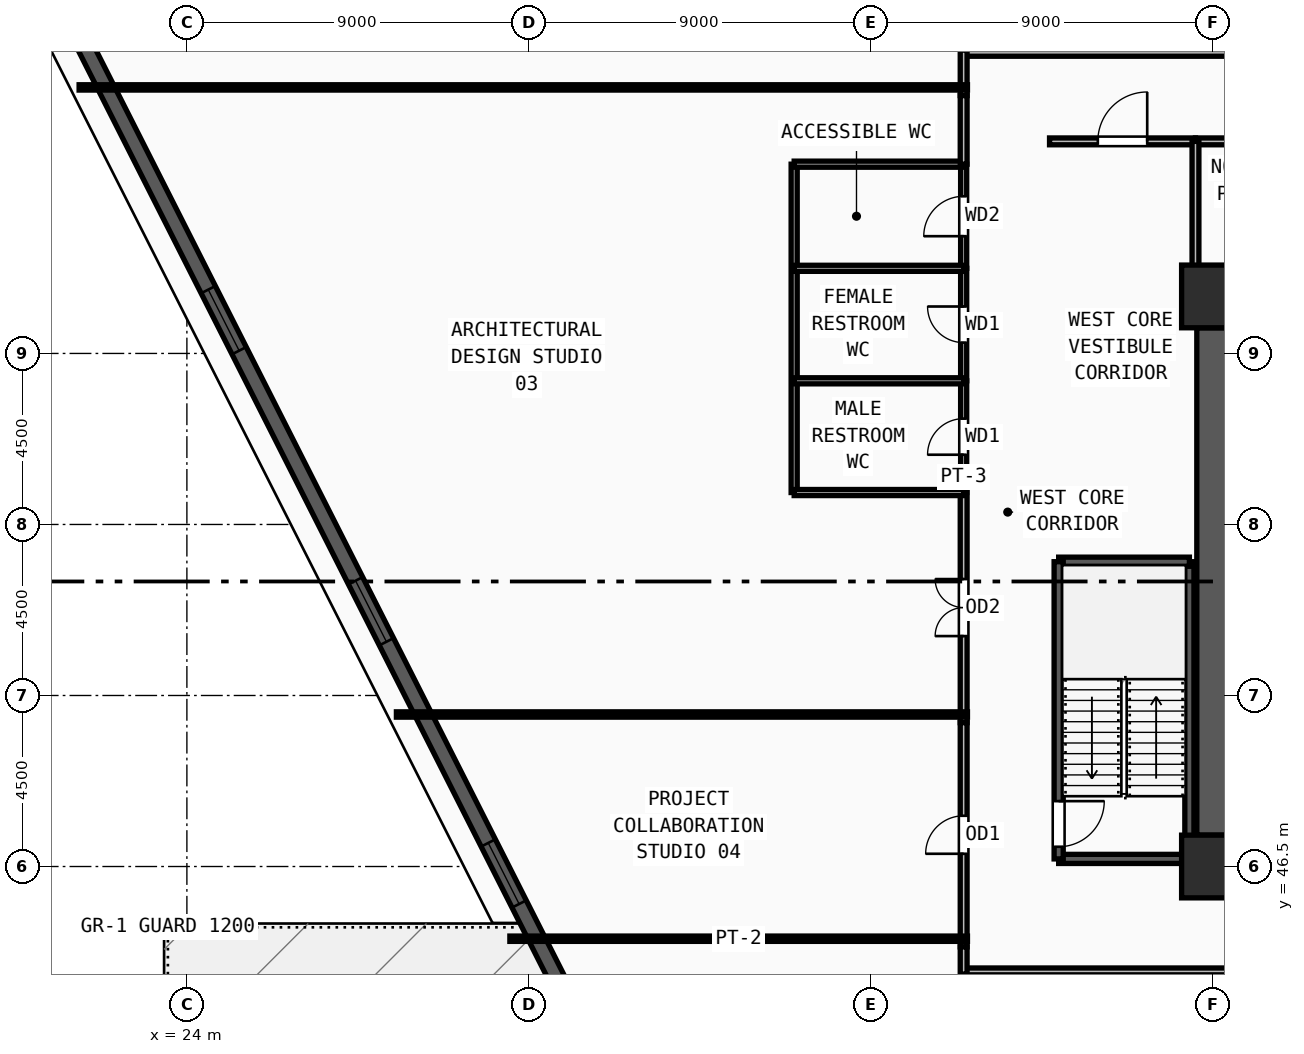
"""IFC4 building model, lengths in metres.
Left out: names, types, materials, properties, quantities, classifications, styles, units other than length and angle.
Written with IfcOpenShell. Run it as: python <this file> out.ifc"""

import sys

from ifc_helpers import new_model, si_unit, direction, frame, frame_2d, origin, origin_2d, place, context, subcontext, project, spatial, rectangle, extrude, source, transform, mapped, element, fill, save


model = new_model("IFC4")
c1 = context("Model", 3, precision=1e-05, world=origin(), true_north=direction((0.0, 1.0)))
c2 = subcontext(c1, "Body", "Model", "MODEL_VIEW")
j1 = project(units=[si_unit("LENGTHUNIT", "METRE"), si_unit("PLANEANGLEUNIT", "RADIAN")], contexts=[c1])
p1 = place(None, origin())
s1 = spatial("IfcSite", under=j1, at=p1, CompositionType="ELEMENT")
p2 = place(p1, origin())
s2 = spatial("IfcBuilding", under=s1, at=p2, CompositionType="ELEMENT")
p3 = place(p2, frame((0.0, 0.0, 28.5)))
s3 = spatial("IfcBuildingStorey", under=s2, at=p3, CompositionType="ELEMENT", Elevation=28.5)
m1 = source(origin(), c2, "Body", "SweptSolid", [
    extrude(rectangle(XDim=1.65, YDim=1.65, at=origin_2d()), origin(), (0.0, 0.0, 1.0), 3.75),
])
for number, where, z_axis, x_axis in (
    (1, (51.0, 46.5, 0.0), (0.0, 0.0, 1.0), (1.0, 0.0, 0.0)),
    (2, (51.0, 61.5, 0.0), (0.0, 0.0, 1.0), (1.0, 0.0, 0.0)),
):
    element("IfcColumn", number, at=place(p3, frame(where, z_axis=z_axis, x_axis=x_axis)), inside=s3, PredefinedType="COLUMN", context=c2, shape_type="MappedRepresentation", body=[
        mapped(m1, transform((0.0, 0.0, 0.0), x_axis=(1.0, 0.0, 0.0), y_axis=(0.0, 1.0, 0.0), z_axis=(0.0, 0.0, 1.0), scale=1.0)),
    ])
p4 = place(p3, frame((21.093, 68.534, 0.0), z_axis=(0.0, 0.0, 1.0), x_axis=(0.451540292752, -0.892250729348, 0.0)))
e3 = element("IfcWall", 3, at=p4, inside=s3, PredefinedType="SOLIDWALL", context=c2, shape_type="SweptSolid", body=[
    extrude(rectangle(XDim=34.333, YDim=0.42, at=frame_2d((17.167, 0.0))), origin(), (0.0, 0.0, 1.0), 3.57),
])
m2 = source(origin(), c2, "Body", "SweptSolid", [
    extrude(rectangle(XDim=1.8, YDim=1.95, at=frame_2d((0.9, 0.975))), frame((0.0, 0.22, 0.0), z_axis=(0.0, -1.0, 0.0), x_axis=(1.0, 0.0, 0.0)), (0.0, 0.0, 1.0), 0.44),
])
p5 = place(p4, frame((7.683, 0.0, 0.55)))
e4 = element("IfcOpeningElement", 4, at=p5, cuts=e3, PredefinedType="OPENING", context=c2, shape_type="MappedRepresentation", body=[
    mapped(m2, transform((0.0, 0.0, 0.0), x_axis=(1.0, 0.0, 0.0), y_axis=(0.0, 1.0, 0.0), z_axis=(0.0, 0.0, 1.0), scale=1.0)),
])
p6 = place(p4, frame((16.267, 0.0, 0.55)))
e5 = element("IfcOpeningElement", 5, at=p6, cuts=e3, PredefinedType="OPENING", context=c2, shape_type="MappedRepresentation", body=[
    mapped(m2, transform((0.0, 0.0, 0.0), x_axis=(1.0, 0.0, 0.0), y_axis=(0.0, 1.0, 0.0), z_axis=(0.0, 0.0, 1.0), scale=1.0)),
])
p7 = place(p4, frame((24.0, 0.0, 0.55)))
e6 = element("IfcOpeningElement", 6, at=p7, cuts=e3, PredefinedType="OPENING", context=c2, shape_type="MappedRepresentation", body=[
    mapped(m2, transform((0.0, 0.0, 0.0), x_axis=(1.0, 0.0, 0.0), y_axis=(0.0, 1.0, 0.0), z_axis=(0.0, 0.0, 1.0), scale=1.0)),
])
p8 = place(p3, frame((51.0, 47.325, 0.0), z_axis=(0.0, 0.0, 1.0), x_axis=(0.0, 1.0, 0.0)))
e7 = element("IfcWall", 7, at=p8, inside=s3, PredefinedType="SHEAR", context=c2, shape_type="SweptSolid", body=[
    extrude(rectangle(XDim=13.35, YDim=0.85, at=frame_2d((6.675, 0.0))), origin(), (0.0, 0.0, 1.0), 3.57),
])
p9 = place(p3, frame((46.94, 46.7, 0.0), z_axis=(0.0, 0.0, 1.0), x_axis=(1.0, 0.0, 0.0)))
e8 = element("IfcWall", 8, at=p9, inside=s3, PredefinedType="SOLIDWALL", context=c2, shape_type="SweptSolid", body=[
    extrude(rectangle(XDim=3.44, YDim=0.24, at=frame_2d((1.72, 0.0))), origin(), (0.0, 0.0, 1.0), 3.57),
])
p10 = place(p3, frame((50.38, 46.7, 0.0), z_axis=(0.0, 0.0, 1.0), x_axis=(0.0, 1.0, 0.0)))
e9 = element("IfcWall", 9, at=p10, inside=s3, PredefinedType="SOLIDWALL", context=c2, shape_type="SweptSolid", body=[
    extrude(rectangle(XDim=7.82, YDim=0.24, at=frame_2d((3.91, 0.0))), origin(), (0.0, 0.0, 1.0), 3.57),
])
p11 = place(p3, frame((50.38, 54.52, 0.0), z_axis=(0.0, 0.0, 1.0), x_axis=(-1.0, 0.0, 0.0)))
e10 = element("IfcWall", 10, at=p11, inside=s3, PredefinedType="SOLIDWALL", context=c2, shape_type="SweptSolid", body=[
    extrude(rectangle(XDim=3.44, YDim=0.24, at=frame_2d((1.72, 0.0))), origin(), (0.0, 0.0, 1.0), 3.57),
])
p12 = place(p3, frame((46.94, 54.52, 0.0), z_axis=(0.0, 0.0, 1.0), x_axis=(0.0, -1.0, 0.0)))
e11 = element("IfcWall", 11, at=p12, inside=s3, PredefinedType="SOLIDWALL", context=c2, shape_type="SweptSolid", body=[
    extrude(rectangle(XDim=7.82, YDim=0.24, at=frame_2d((3.91, 0.0))), origin(), (0.0, 0.0, 1.0), 3.57),
])
m3 = source(origin(), c2, "Body", "SweptSolid", [
    extrude(rectangle(XDim=1.2, YDim=2.2, at=frame_2d((0.6, 1.1))), frame((0.0, 0.13, 0.0), z_axis=(0.0, -1.0, 0.0), x_axis=(1.0, 0.0, 0.0)), (0.0, 0.0, 1.0), 0.26),
])
p13 = place(p12, frame((6.3, 0.0, 0.0)))
e12 = element("IfcOpeningElement", 12, at=p13, cuts=e11, PredefinedType="OPENING", context=c2, shape_type="MappedRepresentation", body=[
    mapped(m3, transform((0.0, 0.0, 0.0), x_axis=(1.0, 0.0, 0.0), y_axis=(0.0, 1.0, 0.0), z_axis=(0.0, 0.0, 1.0), scale=1.0)),
])
p14 = place(p3, frame((44.44, 56.34, 0.0), z_axis=(0.0, 0.0, 1.0), x_axis=(0.0, 1.0, 0.0)))
e13 = element("IfcWall", 13, at=p14, inside=s3, PredefinedType="PARTITIONING", context=c2, shape_type="SweptSolid", body=[
    extrude(rectangle(XDim=2.94, YDim=0.16, at=frame_2d((1.47, 0.0))), origin(), (0.0, 0.0, 1.0), 3.57),
])
m4 = source(origin(), c2, "Body", "SweptSolid", [
    extrude(rectangle(XDim=0.95, YDim=2.15, at=frame_2d((0.475, 1.075))), frame((0.0, 0.09, 0.0), z_axis=(0.0, -1.0, 0.0), x_axis=(1.0, 0.0, 0.0)), (0.0, 0.0, 1.0), 0.18),
])
p15 = place(p14, frame((0.995, 0.0, 0.0)))
e14 = element("IfcOpeningElement", 14, at=p15, cuts=e13, PredefinedType="OPENING", context=c2, shape_type="MappedRepresentation", body=[
    mapped(m4, transform((0.0, 0.0, 0.0), x_axis=(1.0, 0.0, 0.0), y_axis=(0.0, 1.0, 0.0), z_axis=(0.0, 0.0, 1.0), scale=1.0)),
])
p16 = place(p3, frame((44.44, 59.28, 0.0), z_axis=(0.0, 0.0, 1.0), x_axis=(0.0, 1.0, 0.0)))
e15 = element("IfcWall", 15, at=p16, inside=s3, PredefinedType="PARTITIONING", context=c2, shape_type="SweptSolid", body=[
    extrude(rectangle(XDim=2.96, YDim=0.16, at=frame_2d((1.48, 0.0))), origin(), (0.0, 0.0, 1.0), 3.57),
])
p17 = place(p16, frame((1.005, 0.0, 0.0)))
e16 = element("IfcOpeningElement", 16, at=p17, cuts=e15, PredefinedType="OPENING", context=c2, shape_type="MappedRepresentation", body=[
    mapped(m4, transform((0.0, 0.0, 0.0), x_axis=(1.0, 0.0, 0.0), y_axis=(0.0, 1.0, 0.0), z_axis=(0.0, 0.0, 1.0), scale=1.0)),
])
p18 = place(p3, frame((44.44, 62.24, 0.0), z_axis=(0.0, 0.0, 1.0), x_axis=(0.0, 1.0, 0.0)))
e17 = element("IfcWall", 17, at=p18, inside=s3, PredefinedType="PARTITIONING", context=c2, shape_type="SweptSolid", body=[
    extrude(rectangle(XDim=2.74, YDim=0.16, at=frame_2d((1.37, 0.0))), origin(), (0.0, 0.0, 1.0), 3.57),
])
m5 = source(origin(), c2, "Body", "SweptSolid", [
    extrude(rectangle(XDim=1.05, YDim=2.15, at=frame_2d((0.525, 1.075))), frame((0.0, 0.09, 0.0), z_axis=(0.0, -1.0, 0.0), x_axis=(1.0, 0.0, 0.0)), (0.0, 0.0, 1.0), 0.18),
])
p19 = place(p18, frame((0.845, 0.0, 0.0)))
e18 = element("IfcOpeningElement", 18, at=p19, cuts=e17, PredefinedType="OPENING", context=c2, shape_type="MappedRepresentation", body=[
    mapped(m5, transform((0.0, 0.0, 0.0), x_axis=(1.0, 0.0, 0.0), y_axis=(0.0, 1.0, 0.0), z_axis=(0.0, 0.0, 1.0), scale=1.0)),
])
p20 = place(p3, frame((50.54, 65.58, 0.0), z_axis=(0.0, 0.0, 1.0), x_axis=(1.0, 0.0, 0.0)))
e19 = element("IfcWall", 19, at=p20, inside=s3, PredefinedType="PARTITIONING", context=c2, shape_type="SweptSolid", body=[
    extrude(rectangle(XDim=3.87, YDim=0.18, at=frame_2d((1.935, 0.0))), origin(), (0.0, 0.0, 1.0), 3.57),
])
m6 = source(origin(), c2, "Body", "SweptSolid", [
    extrude(rectangle(XDim=1.0, YDim=2.2, at=frame_2d((0.5, 1.1))), frame((0.0, 0.1, 0.0), z_axis=(0.0, -1.0, 0.0), x_axis=(1.0, 0.0, 0.0)), (0.0, 0.0, 1.0), 0.2),
])
p21 = place(p20, frame((1.435, 0.0, 0.0)))
e20 = element("IfcOpeningElement", 20, at=p21, cuts=e19, PredefinedType="OPENING", context=c2, shape_type="MappedRepresentation", body=[
    mapped(m6, transform((0.0, 0.0, 0.0), x_axis=(1.0, 0.0, 0.0), y_axis=(0.0, 1.0, 0.0), z_axis=(0.0, 0.0, 1.0), scale=1.0)),
])
p22 = place(p3, frame((46.7, 65.58, 0.0), z_axis=(0.0, 0.0, 1.0), x_axis=(1.0, 0.0, 0.0)))
e21 = element("IfcWall", 21, at=p22, inside=s3, PredefinedType="PARTITIONING", context=c2, shape_type="SweptSolid", body=[
    extrude(rectangle(XDim=3.84, YDim=0.18, at=frame_2d((1.92, 0.0))), origin(), (0.0, 0.0, 1.0), 3.57),
])
m7 = source(origin(), c2, "Body", "SweptSolid", [
    extrude(rectangle(XDim=1.3, YDim=2.2, at=frame_2d((0.65, 1.1))), frame((0.0, 0.1, 0.0), z_axis=(0.0, -1.0, 0.0), x_axis=(1.0, 0.0, 0.0)), (0.0, 0.0, 1.0), 0.2),
])
p23 = place(p22, frame((1.27, 0.0, 0.0)))
e22 = element("IfcOpeningElement", 22, at=p23, cuts=e21, PredefinedType="OPENING", context=c2, shape_type="MappedRepresentation", body=[
    mapped(m7, transform((0.0, 0.0, 0.0), x_axis=(1.0, 0.0, 0.0), y_axis=(0.0, 1.0, 0.0), z_axis=(0.0, 0.0, 1.0), scale=1.0)),
])
p24 = place(p3, frame((44.37, 67.91, 0.0), z_axis=(0.0, 0.0, 1.0), x_axis=(1.0, 0.0, 0.0)))
e23 = element("IfcWall", 23, at=p24, inside=s3, PredefinedType="PARTITIONING", context=c2, shape_type="SweptSolid", body=[
    extrude(rectangle(XDim=31.26, YDim=0.18, at=frame_2d((15.63, 0.0))), origin(), (0.0, 0.0, 1.0), 3.57),
])
m8 = source(origin(), c2, "Body", "SweptSolid", [
    extrude(rectangle(XDim=1.5, YDim=2.2, at=frame_2d((0.75, 1.1))), frame((0.0, 0.1, 0.0), z_axis=(0.0, -1.0, 0.0), x_axis=(1.0, 0.0, 0.0)), (0.0, 0.0, 1.0), 0.2),
])
p25 = place(p24, frame((14.88, 0.0, 0.0)))
e24 = element("IfcOpeningElement", 24, at=p25, cuts=e23, PredefinedType="OPENING", context=c2, shape_type="MappedRepresentation", body=[
    mapped(m8, transform((0.0, 0.0, 0.0), x_axis=(1.0, 0.0, 0.0), y_axis=(0.0, 1.0, 0.0), z_axis=(0.0, 0.0, 1.0), scale=1.0)),
])
p26 = place(p3, frame((44.44, 50.285, 0.0), z_axis=(0.0, 0.0, 1.0), x_axis=(0.0, 1.0, 0.0)))
e25 = element("IfcWall", 25, at=p26, inside=s3, PredefinedType="PARTITIONING", context=c2, shape_type="SweptSolid", body=[
    extrude(rectangle(XDim=6.055, YDim=0.18, at=frame_2d((3.028, 0.0))), origin(), (0.0, 0.0, 1.0), 3.57),
])
p27 = place(p26, frame((2.278, 0.0, 0.0)))
e26 = element("IfcOpeningElement", 26, at=p27, cuts=e25, PredefinedType="OPENING", context=c2, shape_type="MappedRepresentation", body=[
    mapped(m8, transform((0.0, 0.0, 0.0), x_axis=(1.0, 0.0, 0.0), y_axis=(0.0, 1.0, 0.0), z_axis=(0.0, 0.0, 1.0), scale=1.0)),
])
p28 = place(p3, frame((44.44, 44.385, 0.0), z_axis=(0.0, 0.0, 1.0), x_axis=(0.0, 1.0, 0.0)))
e27 = element("IfcWall", 27, at=p28, inside=s3, PredefinedType="PARTITIONING", context=c2, shape_type="SweptSolid", body=[
    extrude(rectangle(XDim=5.9, YDim=0.18, at=frame_2d((2.95, 0.0))), origin(), (0.0, 0.0, 1.0), 3.57),
])
p29 = place(p28, frame((2.45, 0.0, 0.0)))
e28 = element("IfcOpeningElement", 28, at=p29, cuts=e27, PredefinedType="OPENING", context=c2, shape_type="MappedRepresentation", body=[
    mapped(m6, transform((0.0, 0.0, 0.0), x_axis=(1.0, 0.0, 0.0), y_axis=(0.0, 1.0, 0.0), z_axis=(0.0, 0.0, 1.0), scale=1.0)),
])
p30 = place(p3, frame((75.63, 43.74, 0.0), z_axis=(0.0, 0.0, 1.0), x_axis=(-1.0, 0.0, 0.0)))
e29 = element("IfcWall", 29, at=p30, inside=s3, PredefinedType="PARTITIONING", context=c2, shape_type="SweptSolid", body=[
    extrude(rectangle(XDim=31.26, YDim=0.18, at=frame_2d((15.63, 0.0))), origin(), (0.0, 0.0, 1.0), 3.57),
])
p31 = place(p30, frame((9.78, 0.0, 0.0)))
e30 = element("IfcOpeningElement", 30, at=p31, cuts=e29, PredefinedType="OPENING", context=c2, shape_type="MappedRepresentation", body=[
    mapped(m8, transform((0.0, 0.0, 0.0), x_axis=(1.0, 0.0, 0.0), y_axis=(0.0, 1.0, 0.0), z_axis=(0.0, 0.0, 1.0), scale=1.0)),
])
p32 = place(p3, frame((39.98, 56.34, 0.0), z_axis=(0.0, 0.0, 1.0), x_axis=(0.0, 1.0, 0.0)))
e31 = element("IfcWall", 31, at=p32, inside=s3, PredefinedType="PARTITIONING", context=c2, shape_type="SweptSolid", body=[
    extrude(rectangle(XDim=8.64, YDim=0.16, at=frame_2d((4.32, 0.0))), origin(), (0.0, 0.0, 1.0), 3.57),
])
for number, where, z_axis, x_axis in (
    (32, (39.98, 56.34, 0.0), (0.0, 0.0, 1.0), (1.0, 0.0, 0.0)),
    (33, (39.98, 59.28, 0.0), (0.0, 0.0, 1.0), (1.0, 0.0, 0.0)),
    (34, (39.98, 62.24, 0.0), (0.0, 0.0, 1.0), (1.0, 0.0, 0.0)),
    (35, (39.98, 64.98, 0.0), (0.0, 0.0, 1.0), (1.0, 0.0, 0.0)),
):
    element("IfcWall", number, at=place(p3, frame(where, z_axis=z_axis, x_axis=x_axis)), inside=s3, PredefinedType="PARTITIONING", context=c2, shape_type="SweptSolid", body=[
        extrude(rectangle(XDim=4.46, YDim=0.16, at=frame_2d((2.23, 0.0))), origin(), (0.0, 0.0, 1.0), 3.57),
    ])
p33 = place(p3, frame((50.54, 61.95, 0.0), z_axis=(0.0, 0.0, 1.0), x_axis=(0.0, 1.0, 0.0)))
e36 = element("IfcWall", 36, at=p33, inside=s3, PredefinedType="PARTITIONING", context=c2, shape_type="SweptSolid", body=[
    extrude(rectangle(XDim=3.63, YDim=0.18, at=frame_2d((1.815, 0.0))), origin(), (0.0, 0.0, 1.0), 3.57),
])
p34 = place(p3, frame((44.44, 66.785, 0.0), z_axis=(0.0, 0.0, 1.0), x_axis=(0.0, 1.0, 0.0)))
e37 = element("IfcWall", 37, at=p34, inside=s3, PredefinedType="PARTITIONING", context=c2, shape_type="SweptSolid", body=[
    extrude(rectangle(XDim=1.195, YDim=0.18, at=frame_2d((0.598, 0.0))), origin(), (0.0, 0.0, 1.0), 3.57),
])
p35 = place(p3, frame((44.44, 64.98, 0.0), z_axis=(0.0, 0.0, 1.0), x_axis=(0.0, 1.0, 0.0)))
e38 = element("IfcWall", 38, at=p35, inside=s3, PredefinedType="PARTITIONING", context=c2, shape_type="SweptSolid", body=[
    extrude(rectangle(XDim=1.805, YDim=0.18, at=frame_2d((0.902, 0.0))), origin(), (0.0, 0.0, 1.0), 3.57),
])
p36 = place(p3, frame((44.44, 43.67, 0.0), z_axis=(0.0, 0.0, 1.0), x_axis=(0.0, 1.0, 0.0)))
e39 = element("IfcWall", 39, at=p36, inside=s3, PredefinedType="PARTITIONING", context=c2, shape_type="SweptSolid", body=[
    extrude(rectangle(XDim=0.715, YDim=0.18, at=frame_2d((0.357, 0.0))), origin(), (0.0, 0.0, 1.0), 3.57),
])
p37 = place(p3, frame((44.54, 44.6, 0.0), z_axis=(0.0, 0.0, 1.0), x_axis=(-1.0, 0.0, 0.0)))
e40 = element("IfcWall", 40, at=p37, inside=s3, PredefinedType="PARTITIONING", context=c2, shape_type="SweptSolid", body=[
    extrude(rectangle(XDim=12.041, YDim=0.14, at=frame_2d((6.021, 0.0))), origin(), (0.0, 0.0, 1.0), 3.57),
])
p38 = place(p3, frame((44.54, 50.5, 0.0), z_axis=(0.0, 0.0, 1.0), x_axis=(-1.0, 0.0, 0.0)))
e41 = element("IfcWall", 41, at=p38, inside=s3, PredefinedType="PARTITIONING", context=c2, shape_type="SweptSolid", body=[
    extrude(rectangle(XDim=15.027, YDim=0.14, at=frame_2d((7.514, 0.0))), origin(), (0.0, 0.0, 1.0), 3.57),
])
p39 = place(p3, frame((44.54, 67.0, 0.0), z_axis=(0.0, 0.0, 1.0), x_axis=(-1.0, 0.0, 0.0)))
e42 = element("IfcWall", 42, at=p39, inside=s3, PredefinedType="PARTITIONING", context=c2, shape_type="SweptSolid", body=[
    extrude(rectangle(XDim=23.376, YDim=0.14, at=frame_2d((11.688, 0.0))), origin(), (0.0, 0.0, 1.0), 2.655),
])
m9 = source(origin(), c2, "Body", "SweptSolid", [
    extrude(rectangle(XDim=1.8, YDim=1.95, at=frame_2d((0.9, 0.975))), frame((0.0, 0.03, 0.0), z_axis=(0.0, -1.0, 0.0), x_axis=(1.0, 0.0, 0.0)), (0.0, 0.0, 1.0), 0.06),
])
p40 = place(p5, origin())
e43 = element("IfcWindow", 43, at=p40, inside=s3, PartitioningType="DOUBLE_PANEL_VERTICAL", PredefinedType="WINDOW", context=c2, shape_type="MappedRepresentation", body=[
    mapped(m9, transform((0.0, 0.0, 0.0), x_axis=(1.0, 0.0, 0.0), y_axis=(0.0, 1.0, 0.0), z_axis=(0.0, 0.0, 1.0), scale=1.0)),
])
fill(e4, e43)
p41 = place(p6, origin())
e44 = element("IfcWindow", 44, at=p41, inside=s3, PartitioningType="DOUBLE_PANEL_VERTICAL", PredefinedType="WINDOW", context=c2, shape_type="MappedRepresentation", body=[
    mapped(m9, transform((0.0, 0.0, 0.0), x_axis=(1.0, 0.0, 0.0), y_axis=(0.0, 1.0, 0.0), z_axis=(0.0, 0.0, 1.0), scale=1.0)),
])
fill(e5, e44)
p42 = place(p7, origin())
e45 = element("IfcWindow", 45, at=p42, inside=s3, PartitioningType="DOUBLE_PANEL_VERTICAL", PredefinedType="WINDOW", context=c2, shape_type="MappedRepresentation", body=[
    mapped(m9, transform((0.0, 0.0, 0.0), x_axis=(1.0, 0.0, 0.0), y_axis=(0.0, 1.0, 0.0), z_axis=(0.0, 0.0, 1.0), scale=1.0)),
])
fill(e6, e45)
m10 = source(origin(), c2, "Body", "SweptSolid", [
    extrude(rectangle(XDim=1.2, YDim=2.2, at=frame_2d((0.6, 1.1))), frame((0.0, 0.025, 0.0), z_axis=(0.0, -1.0, 0.0), x_axis=(1.0, 0.0, 0.0)), (0.0, 0.0, 1.0), 0.05),
])
p43 = place(p13, origin())
e46 = element("IfcDoor", 46, at=p43, inside=s3, OperationType="SINGLE_SWING_LEFT", PredefinedType="DOOR", context=c2, shape_type="MappedRepresentation", body=[
    mapped(m10, transform((0.0, 0.0, 0.0), x_axis=(1.0, 0.0, 0.0), y_axis=(0.0, 1.0, 0.0), z_axis=(0.0, 0.0, 1.0), scale=1.0)),
])
fill(e12, e46)
m11 = source(origin(), c2, "Body", "SweptSolid", [
    extrude(rectangle(XDim=0.95, YDim=2.15, at=frame_2d((0.475, 1.075))), frame((0.0, 0.025, 0.0), z_axis=(0.0, -1.0, 0.0), x_axis=(1.0, 0.0, 0.0)), (0.0, 0.0, 1.0), 0.05),
])
p44 = place(p15, origin())
e47 = element("IfcDoor", 47, at=p44, inside=s3, OperationType="SINGLE_SWING_LEFT", PredefinedType="DOOR", context=c2, shape_type="MappedRepresentation", body=[
    mapped(m11, transform((0.0, 0.0, 0.0), x_axis=(1.0, 0.0, 0.0), y_axis=(0.0, 1.0, 0.0), z_axis=(0.0, 0.0, 1.0), scale=1.0)),
])
fill(e14, e47)
p45 = place(p17, origin())
e48 = element("IfcDoor", 48, at=p45, inside=s3, OperationType="SINGLE_SWING_RIGHT", PredefinedType="DOOR", context=c2, shape_type="MappedRepresentation", body=[
    mapped(m11, transform((0.0, 0.0, 0.0), x_axis=(1.0, 0.0, 0.0), y_axis=(0.0, 1.0, 0.0), z_axis=(0.0, 0.0, 1.0), scale=1.0)),
])
fill(e16, e48)
m12 = source(origin(), c2, "Body", "SweptSolid", [
    extrude(rectangle(XDim=1.05, YDim=2.15, at=frame_2d((0.525, 1.075))), frame((0.0, 0.025, 0.0), z_axis=(0.0, -1.0, 0.0), x_axis=(1.0, 0.0, 0.0)), (0.0, 0.0, 1.0), 0.05),
])
p46 = place(p19, origin())
e49 = element("IfcDoor", 49, at=p46, inside=s3, OperationType="SINGLE_SWING_LEFT", PredefinedType="DOOR", context=c2, shape_type="MappedRepresentation", body=[
    mapped(m12, transform((0.0, 0.0, 0.0), x_axis=(1.0, 0.0, 0.0), y_axis=(0.0, 1.0, 0.0), z_axis=(0.0, 0.0, 1.0), scale=1.0)),
])
fill(e18, e49)
m13 = source(origin(), c2, "Body", "SweptSolid", [
    extrude(rectangle(XDim=1.3, YDim=2.2, at=frame_2d((0.65, 1.1))), frame((0.0, 0.025, 0.0), z_axis=(0.0, -1.0, 0.0), x_axis=(1.0, 0.0, 0.0)), (0.0, 0.0, 1.0), 0.05),
])
p47 = place(p23, origin())
e50 = element("IfcDoor", 50, at=p47, inside=s3, OperationType="SINGLE_SWING_RIGHT", PredefinedType="DOOR", context=c2, shape_type="MappedRepresentation", body=[
    mapped(m13, transform((0.0, 0.0, 0.0), x_axis=(1.0, 0.0, 0.0), y_axis=(0.0, 1.0, 0.0), z_axis=(0.0, 0.0, 1.0), scale=1.0)),
])
fill(e22, e50)
m14 = source(origin(), c2, "Body", "SweptSolid", [
    extrude(rectangle(XDim=1.5, YDim=2.2, at=frame_2d((0.75, 1.1))), frame((0.0, 0.025, 0.0), z_axis=(0.0, -1.0, 0.0), x_axis=(1.0, 0.0, 0.0)), (0.0, 0.0, 1.0), 0.05),
])
p48 = place(p27, origin())
e51 = element("IfcDoor", 51, at=p48, inside=s3, OperationType="DOUBLE_DOOR_SINGLE_SWING", PredefinedType="DOOR", context=c2, shape_type="MappedRepresentation", body=[
    mapped(m14, transform((0.0, 0.0, 0.0), x_axis=(1.0, 0.0, 0.0), y_axis=(0.0, 1.0, 0.0), z_axis=(0.0, 0.0, 1.0), scale=1.0)),
])
fill(e26, e51)
m15 = source(origin(), c2, "Body", "SweptSolid", [
    extrude(rectangle(XDim=1.0, YDim=2.2, at=frame_2d((0.5, 1.1))), frame((0.0, 0.025, 0.0), z_axis=(0.0, -1.0, 0.0), x_axis=(1.0, 0.0, 0.0)), (0.0, 0.0, 1.0), 0.05),
])
p49 = place(p29, origin())
e52 = element("IfcDoor", 52, at=p49, inside=s3, OperationType="SINGLE_SWING_LEFT", PredefinedType="DOOR", context=c2, shape_type="MappedRepresentation", body=[
    mapped(m15, transform((0.0, 0.0, 0.0), x_axis=(1.0, 0.0, 0.0), y_axis=(0.0, 1.0, 0.0), z_axis=(0.0, 0.0, 1.0), scale=1.0)),
])
fill(e28, e52)
save(model, sys.argv[1])
